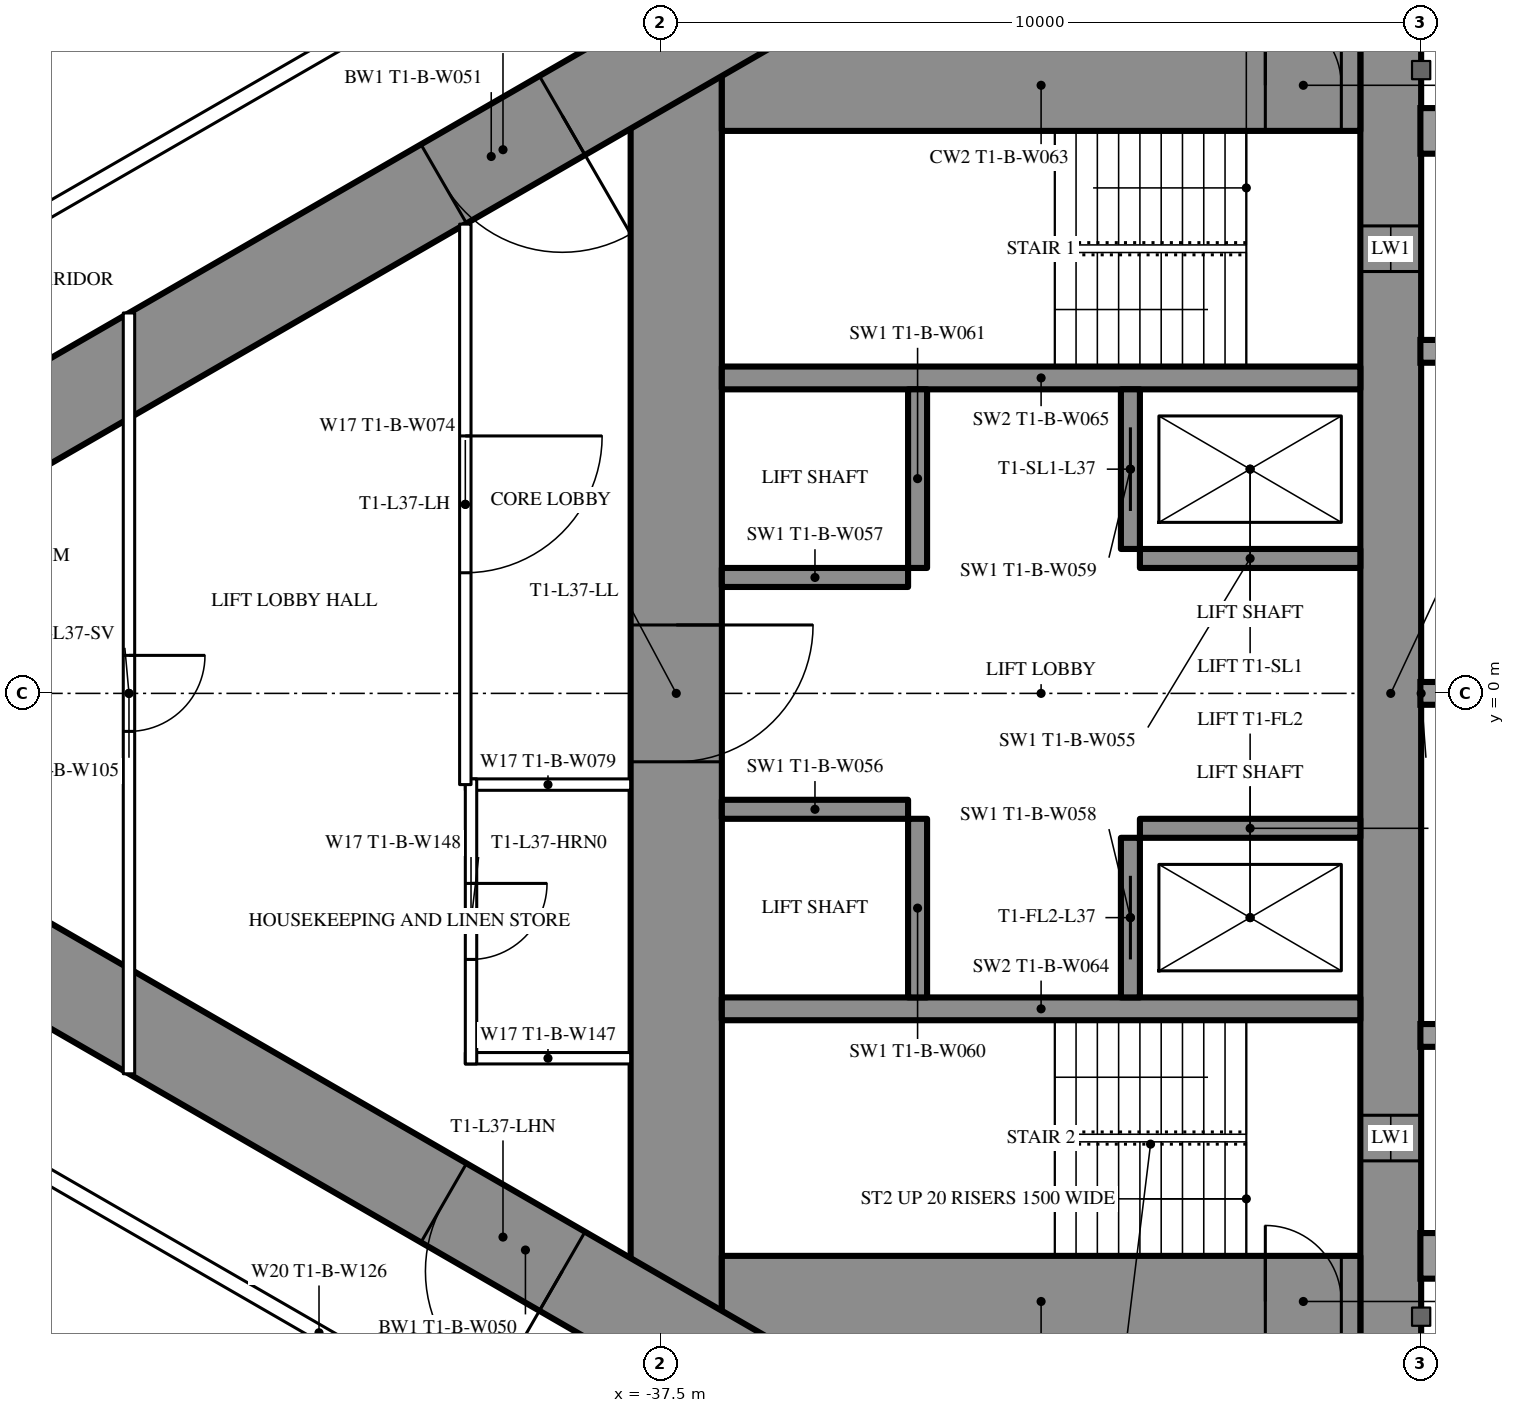
"""IFC4 building model, lengths in metres.
Left out: names, types, materials, properties, quantities, classifications, styles, units other than length and angle.
Written with IfcOpenShell. Run it as: python <this file> out.ifc"""

import sys

from ifc_helpers import new_model, si_unit, direction, frame, frame_2d, origin, place, context, subcontext, project, spatial, rectangle, extrude, element, fill, save


model = new_model("IFC4")
c1 = context("Model", 3, precision=1e-05, world=origin(), true_north=direction((0.0, 1.0)))
c2 = subcontext(c1, "Body", "Model", "MODEL_VIEW")
j1 = project(units=[si_unit("LENGTHUNIT", "METRE"), si_unit("PLANEANGLEUNIT", "RADIAN")], contexts=[c1])
p1 = place(None, origin())
s1 = spatial("IfcSite", under=j1, at=p1, CompositionType="ELEMENT")
p2 = place(p1, origin())
s2 = spatial("IfcBuilding", under=s1, at=p2, CompositionType="ELEMENT")
p3 = place(p2, frame((0.0, 0.0, 139.6)))
s3 = spatial("IfcBuildingStorey", under=s2, at=p3, CompositionType="ELEMENT", Elevation=139.6)
p4 = place(p3, frame((-27.9, 8.6, 0.0), z_axis=(0.0, 0.0, 1.0), x_axis=(0.0, -1.0, 0.0)))
e1 = element("IfcWall", 1, at=p4, inside=s3, PredefinedType="SHEAR", context=c2, shape_type="SweptSolid", body=[
    extrude(rectangle(XDim=17.2, YDim=0.8, at=frame_2d((8.6, 0.0))), origin(), (0.0, 0.0, 1.0), 3.5),
])
p5 = place(p4, frame((2.45, 0.0, 0.6)))
e2 = element("IfcOpeningElement", 2, at=p5, cuts=e1, PredefinedType="OPENING", context=c2, shape_type="SweptSolid", body=[
    extrude(rectangle(XDim=0.6, YDim=2.1, at=frame_2d((0.3, 1.05))), frame((0.0, 0.41, 0.0), z_axis=(0.0, -1.0, 0.0), x_axis=(1.0, 0.0, 0.0)), (0.0, 0.0, 1.0), 0.82),
])
p6 = place(p4, frame((14.15, 0.0, 0.6)))
e3 = element("IfcOpeningElement", 3, at=p6, cuts=e1, PredefinedType="OPENING", context=c2, shape_type="SweptSolid", body=[
    extrude(rectangle(XDim=0.6, YDim=2.1, at=frame_2d((0.3, 1.05))), frame((0.0, 0.41, 0.0), z_axis=(0.0, -1.0, 0.0), x_axis=(1.0, 0.0, 0.0)), (0.0, 0.0, 1.0), 0.82),
])
p7 = place(p3, frame((-37.3, 8.6, 0.0), z_axis=(0.0, 0.0, 1.0), x_axis=(0.0, -1.0, 0.0)))
e4 = element("IfcWall", 4, at=p7, inside=s3, PredefinedType="SHEAR", context=c2, shape_type="SweptSolid", body=[
    extrude(rectangle(XDim=17.2, YDim=1.2, at=frame_2d((8.6, 0.0))), origin(), (0.0, 0.0, 1.0), 3.5),
])
p8 = place(p7, frame((7.7, 0.0, 0.0)))
e5 = element("IfcOpeningElement", 5, at=p8, cuts=e4, PredefinedType="OPENING", context=c2, shape_type="SweptSolid", body=[
    extrude(rectangle(XDim=1.8, YDim=2.2, at=frame_2d((0.9, 1.1))), frame((0.0, 0.61, 0.0), z_axis=(0.0, -1.0, 0.0), x_axis=(1.0, 0.0, 0.0)), (0.0, 0.0, 1.0), 1.22),
])
p9 = place(p3, frame((-28.3, 8.0, 0.0), z_axis=(0.0, 0.0, 1.0), x_axis=(-1.0, 0.0, 0.0)))
e6 = element("IfcWall", 6, at=p9, inside=s3, PredefinedType="SHEAR", context=c2, shape_type="SweptSolid", body=[
    extrude(rectangle(XDim=8.4, YDim=1.2, at=frame_2d((4.2, 0.0))), origin(), (0.0, 0.0, 1.0), 3.5),
])
p10 = place(p9, frame((0.25, 0.0, 0.0)))
e7 = element("IfcOpeningElement", 7, at=p10, cuts=e6, PredefinedType="OPENING", context=c2, shape_type="SweptSolid", body=[
    extrude(rectangle(XDim=1.0, YDim=2.2, at=frame_2d((0.5, 1.1))), frame((0.0, 0.61, 0.0), z_axis=(0.0, -1.0, 0.0), x_axis=(1.0, 0.0, 0.0)), (0.0, 0.0, 1.0), 1.22),
])
p11 = place(p3, frame((-28.3, -8.0, 0.0), z_axis=(0.0, 0.0, 1.0), x_axis=(-1.0, 0.0, 0.0)))
e8 = element("IfcWall", 8, at=p11, inside=s3, PredefinedType="SHEAR", context=c2, shape_type="SweptSolid", body=[
    extrude(rectangle(XDim=8.4, YDim=1.2, at=frame_2d((4.2, 0.0))), origin(), (0.0, 0.0, 1.0), 3.5),
])
p12 = place(p11, frame((0.25, 0.0, 0.0)))
e9 = element("IfcOpeningElement", 9, at=p12, cuts=e8, PredefinedType="OPENING", context=c2, shape_type="SweptSolid", body=[
    extrude(rectangle(XDim=1.0, YDim=2.2, at=frame_2d((0.5, 1.1))), frame((0.0, 0.61, 0.0), z_axis=(0.0, -1.0, 0.0), x_axis=(1.0, 0.0, 0.0)), (0.0, 0.0, 1.0), 1.22),
])
for number, where, z_axis, x_axis in (
    (10, (-28.3, 4.15, 0.0), (0.0, 0.0, 1.0), (-1.0, 0.0, 0.0)),
    (11, (-28.3, -4.15, 0.0), (0.0, 0.0, 1.0), (-1.0, 0.0, 0.0)),
):
    element("IfcWall", number, at=place(p3, frame(where, z_axis=z_axis, x_axis=x_axis)), inside=s3, PredefinedType="SHEAR", context=c2, shape_type="SweptSolid", body=[
        extrude(rectangle(XDim=8.4, YDim=0.3, at=frame_2d((4.2, 0.0))), origin(), (0.0, 0.0, 1.0), 3.5),
    ])
p13 = place(p3, frame((-31.325, 4.0, 0.0), z_axis=(0.0, 0.0, 1.0), x_axis=(0.0, -1.0, 0.0)))
e12 = element("IfcWall", 12, at=p13, inside=s3, PredefinedType="SHEAR", context=c2, shape_type="SweptSolid", body=[
    extrude(rectangle(XDim=2.1, YDim=0.25, at=frame_2d((1.05, 0.0))), origin(), (0.0, 0.0, 1.0), 3.5),
])
p14 = place(p13, frame((0.5, 0.0, 0.0)))
e13 = element("IfcOpeningElement", 13, at=p14, cuts=e12, PredefinedType="OPENING", context=c2, shape_type="SweptSolid", body=[
    extrude(rectangle(XDim=1.1, YDim=2.2, at=frame_2d((0.55, 1.1))), frame((0.0, 0.135, 0.0), z_axis=(0.0, -1.0, 0.0), x_axis=(1.0, 0.0, 0.0)), (0.0, 0.0, 1.0), 0.27),
])
p15 = place(p3, frame((-34.125, 4.0, 0.0), z_axis=(0.0, 0.0, 1.0), x_axis=(0.0, -1.0, 0.0)))
e14 = element("IfcWall", 14, at=p15, inside=s3, PredefinedType="SHEAR", context=c2, shape_type="SweptSolid", body=[
    extrude(rectangle(XDim=2.35, YDim=0.25, at=frame_2d((1.175, 0.0))), origin(), (0.0, 0.0, 1.0), 3.5),
])
p16 = place(p3, frame((-28.3, 1.775, 0.0), z_axis=(0.0, 0.0, 1.0), x_axis=(-1.0, 0.0, 0.0)))
e15 = element("IfcWall", 15, at=p16, inside=s3, PredefinedType="SHEAR", context=c2, shape_type="SweptSolid", body=[
    extrude(rectangle(XDim=2.9, YDim=0.25, at=frame_2d((1.45, 0.0))), origin(), (0.0, 0.0, 1.0), 3.5),
])
p17 = place(p3, frame((-34.25, 1.525, 0.0), z_axis=(0.0, 0.0, 1.0), x_axis=(-1.0, 0.0, 0.0)))
e16 = element("IfcWall", 16, at=p17, inside=s3, PredefinedType="SHEAR", context=c2, shape_type="SweptSolid", body=[
    extrude(rectangle(XDim=2.45, YDim=0.25, at=frame_2d((1.225, 0.0))), origin(), (0.0, 0.0, 1.0), 3.5),
])
p18 = place(p3, frame((-31.325, -1.9, 0.0), z_axis=(0.0, 0.0, 1.0), x_axis=(0.0, -1.0, 0.0)))
e17 = element("IfcWall", 17, at=p18, inside=s3, PredefinedType="SHEAR", context=c2, shape_type="SweptSolid", body=[
    extrude(rectangle(XDim=2.1, YDim=0.25, at=frame_2d((1.05, 0.0))), origin(), (0.0, 0.0, 1.0), 3.5),
])
p19 = place(p18, frame((0.5, 0.0, 0.0)))
e18 = element("IfcOpeningElement", 18, at=p19, cuts=e17, PredefinedType="OPENING", context=c2, shape_type="SweptSolid", body=[
    extrude(rectangle(XDim=1.1, YDim=2.2, at=frame_2d((0.55, 1.1))), frame((0.0, 0.135, 0.0), z_axis=(0.0, -1.0, 0.0), x_axis=(1.0, 0.0, 0.0)), (0.0, 0.0, 1.0), 0.27),
])
p20 = place(p3, frame((-34.125, -1.65, 0.0), z_axis=(0.0, 0.0, 1.0), x_axis=(0.0, -1.0, 0.0)))
e19 = element("IfcWall", 19, at=p20, inside=s3, PredefinedType="SHEAR", context=c2, shape_type="SweptSolid", body=[
    extrude(rectangle(XDim=2.35, YDim=0.25, at=frame_2d((1.175, 0.0))), origin(), (0.0, 0.0, 1.0), 3.5),
])
p21 = place(p3, frame((-28.3, -1.775, 0.0), z_axis=(0.0, 0.0, 1.0), x_axis=(-1.0, 0.0, 0.0)))
e20 = element("IfcWall", 20, at=p21, inside=s3, PredefinedType="SHEAR", context=c2, shape_type="SweptSolid", body=[
    extrude(rectangle(XDim=2.9, YDim=0.25, at=frame_2d((1.45, 0.0))), origin(), (0.0, 0.0, 1.0), 3.5),
])
p22 = place(p3, frame((-34.25, -1.525, 0.0), z_axis=(0.0, 0.0, 1.0), x_axis=(-1.0, 0.0, 0.0)))
e21 = element("IfcWall", 21, at=p22, inside=s3, PredefinedType="SHEAR", context=c2, shape_type="SweptSolid", body=[
    extrude(rectangle(XDim=2.45, YDim=0.25, at=frame_2d((1.225, 0.0))), origin(), (0.0, 0.0, 1.0), 3.5),
])
p23 = place(p3, frame((-27.2, 14.3, 0.0), z_axis=(0.0, 0.0, 1.0), x_axis=(-0.866026593062, -0.499997940104, 0.0)))
e22 = element("IfcWall", 22, at=p23, inside=s3, PredefinedType="SHEAR", context=c2, shape_type="SweptSolid", body=[
    extrude(rectangle(XDim=28.946, YDim=1.2, at=frame_2d((14.473, 0.0))), origin(), (0.0, 0.0, 1.0), 3.5),
])
p24 = place(p23, frame((4.6, 0.0, 0.0)))
e23 = element("IfcOpeningElement", 23, at=p24, cuts=e22, PredefinedType="OPENING", context=c2, shape_type="SweptSolid", body=[
    extrude(rectangle(XDim=1.0, YDim=2.2, at=frame_2d((0.5, 1.1))), frame((0.0, 0.61, 0.0), z_axis=(0.0, -1.0, 0.0), x_axis=(1.0, 0.0, 0.0)), (0.0, 0.0, 1.0), 1.22),
])
p25 = place(p23, frame((13.395, 0.0, 0.0)))
e24 = element("IfcOpeningElement", 24, at=p25, cuts=e22, PredefinedType="OPENING", context=c2, shape_type="SweptSolid", body=[
    extrude(rectangle(XDim=1.8, YDim=2.2, at=frame_2d((0.9, 1.1))), frame((0.0, 0.61, 0.0), z_axis=(0.0, -1.0, 0.0), x_axis=(1.0, 0.0, 0.0)), (0.0, 0.0, 1.0), 1.22),
])
p26 = place(p3, frame((-27.2, -14.3, 0.0), z_axis=(0.0, 0.0, 1.0), x_axis=(-0.866024021859, 0.500002393557, 0.0)))
e25 = element("IfcWall", 25, at=p26, inside=s3, PredefinedType="SHEAR", context=c2, shape_type="SweptSolid", body=[
    extrude(rectangle(XDim=27.907, YDim=1.2, at=frame_2d((13.954, 0.0))), origin(), (0.0, 0.0, 1.0), 3.5),
])
p27 = place(p26, frame((4.6, 0.0, 0.0)))
e26 = element("IfcOpeningElement", 26, at=p27, cuts=e25, PredefinedType="OPENING", context=c2, shape_type="SweptSolid", body=[
    extrude(rectangle(XDim=1.0, YDim=2.2, at=frame_2d((0.5, 1.1))), frame((0.0, 0.61, 0.0), z_axis=(0.0, -1.0, 0.0), x_axis=(1.0, 0.0, 0.0)), (0.0, 0.0, 1.0), 1.22),
])
p28 = place(p26, frame((13.395, 0.0, 0.0)))
e27 = element("IfcOpeningElement", 27, at=p28, cuts=e25, PredefinedType="OPENING", context=c2, shape_type="SweptSolid", body=[
    extrude(rectangle(XDim=1.8, YDim=2.2, at=frame_2d((0.9, 1.1))), frame((0.0, 0.61, 0.0), z_axis=(0.0, -1.0, 0.0), x_axis=(1.0, 0.0, 0.0)), (0.0, 0.0, 1.0), 1.22),
])
p29 = place(p3, frame((-37.7, 10.894, 0.0), z_axis=(0.0, 0.0, 1.0), x_axis=(-0.866027905338, -0.499995667157, 0.0)))
e28 = element("IfcWall", 28, at=p29, inside=s3, PredefinedType="PARTITIONING", context=c2, shape_type="SweptSolid", body=[
    extrude(rectangle(XDim=21.787, YDim=0.2, at=frame_2d((10.894, 0.0))), origin(), (0.0, 0.0, 1.0), 3.25),
])
p30 = place(p29, frame((17.711, 0.0, 0.0)))
e29 = element("IfcOpeningElement", 29, at=p30, cuts=e28, PredefinedType="OPENING", context=c2, shape_type="SweptSolid", body=[
    extrude(rectangle(XDim=0.95, YDim=2.2, at=frame_2d((0.475, 1.1))), frame((0.0, 0.11, 0.0), z_axis=(0.0, -1.0, 0.0), x_axis=(1.0, 0.0, 0.0)), (0.0, 0.0, 1.0), 0.22),
])
p31 = place(p29, frame((19.399, 0.0, 0.0)))
e30 = element("IfcOpeningElement", 30, at=p31, cuts=e28, PredefinedType="OPENING", context=c2, shape_type="SweptSolid", body=[
    extrude(rectangle(XDim=1.8, YDim=2.2, at=frame_2d((0.9, 1.1))), frame((0.0, 0.11, 0.0), z_axis=(0.0, -1.0, 0.0), x_axis=(1.0, 0.0, 0.0)), (0.0, 0.0, 1.0), 0.22),
])
p32 = place(p29, frame((0.6, 0.0, 0.0)))
e31 = element("IfcOpeningElement", 31, at=p32, cuts=e28, PredefinedType="OPENING", context=c2, shape_type="SweptSolid", body=[
    extrude(rectangle(XDim=0.95, YDim=2.2, at=frame_2d((0.475, 1.1))), frame((0.0, 0.11, 0.0), z_axis=(0.0, -1.0, 0.0), x_axis=(1.0, 0.0, 0.0)), (0.0, 0.0, 1.0), 0.22),
])
p33 = place(p3, frame((-36.92, -11.344, 0.0), z_axis=(0.0, 0.0, 1.0), x_axis=(-0.866027897759, 0.499995680284, 0.0)))
e32 = element("IfcWall", 32, at=p33, inside=s3, PredefinedType="PARTITIONING", context=c2, shape_type="SweptSolid", body=[
    extrude(rectangle(XDim=11.731, YDim=0.2, at=frame_2d((5.865, 0.0))), origin(), (0.0, 0.0, 1.0), 3.25),
])
p34 = place(p33, frame((3.35, 0.0, 0.0)))
e33 = element("IfcOpeningElement", 33, at=p34, cuts=e32, PredefinedType="OPENING", context=c2, shape_type="SweptSolid", body=[
    extrude(rectangle(XDim=1.0, YDim=2.2, at=frame_2d((0.5, 1.1))), frame((0.0, 0.11, 0.0), z_axis=(0.0, -1.0, 0.0), x_axis=(1.0, 0.0, 0.0)), (0.0, 0.0, 1.0), 0.22),
])
for number, where, z_axis, x_axis in (
    (34, (-37.9, -1.2, 0.0), (0.0, 0.0, 1.0), (-1.0, 0.0, 0.0)),
    (35, (-37.9, -4.8, 0.0), (0.0, 0.0, 1.0), (-1.0, 0.0, 0.0)),
):
    element("IfcWall", number, at=place(p3, frame(where, z_axis=z_axis, x_axis=x_axis)), inside=s3, PredefinedType="PARTITIONING", context=c2, shape_type="SweptSolid", body=[
        extrude(rectangle(XDim=2.175, YDim=0.15, at=frame_2d((1.087, 0.0))), origin(), (0.0, 0.0, 1.0), 3.25),
    ])
p35 = place(p3, frame((-40.0, -1.125, 0.0), z_axis=(0.0, 0.0, 1.0), x_axis=(0.0, -1.0, 0.0)))
e36 = element("IfcWall", 36, at=p35, inside=s3, PredefinedType="PARTITIONING", context=c2, shape_type="SweptSolid", body=[
    extrude(rectangle(XDim=3.75, YDim=0.15, at=frame_2d((1.875, 0.0))), origin(), (0.0, 0.0, 1.0), 3.25),
])
p36 = place(p35, frame((1.375, 0.0, 0.0)))
e37 = element("IfcOpeningElement", 37, at=p36, cuts=e36, PredefinedType="OPENING", context=c2, shape_type="SweptSolid", body=[
    extrude(rectangle(XDim=1.0, YDim=2.2, at=frame_2d((0.5, 1.1))), frame((0.0, 0.085, 0.0), z_axis=(0.0, -1.0, 0.0), x_axis=(1.0, 0.0, 0.0)), (0.0, 0.0, 1.0), 0.17),
])
p37 = place(p3, frame((-40.075, 6.174, 0.0), z_axis=(0.0, 0.0, 1.0), x_axis=(0.0, -1.0, 0.0)))
e38 = element("IfcWall", 38, at=p37, inside=s3, PredefinedType="PARTITIONING", context=c2, shape_type="SweptSolid", body=[
    extrude(rectangle(XDim=7.374, YDim=0.15, at=frame_2d((3.687, 0.0))), origin(), (0.0, 0.0, 1.0), 3.25),
])
p38 = place(p37, frame((2.787, 0.0, 0.0)))
e39 = element("IfcOpeningElement", 39, at=p38, cuts=e38, PredefinedType="OPENING", context=c2, shape_type="SweptSolid", body=[
    extrude(rectangle(XDim=1.8, YDim=2.2, at=frame_2d((0.9, 1.1))), frame((0.0, 0.085, 0.0), z_axis=(0.0, -1.0, 0.0), x_axis=(1.0, 0.0, 0.0)), (0.0, 0.0, 1.0), 0.17),
])
p39 = place(p3, frame((-44.5, 5.005, 0.0), z_axis=(0.0, 0.0, 1.0), x_axis=(0.0, -1.0, 0.0)))
e40 = element("IfcWall", 40, at=p39, inside=s3, PredefinedType="PARTITIONING", context=c2, shape_type="SweptSolid", body=[
    extrude(rectangle(XDim=10.009, YDim=0.15, at=frame_2d((5.005, 0.0))), origin(), (0.0, 0.0, 1.0), 2.45),
])
p40 = place(p39, frame((4.505, 0.0, 0.0)))
e41 = element("IfcOpeningElement", 41, at=p40, cuts=e40, PredefinedType="OPENING", context=c2, shape_type="SweptSolid", body=[
    extrude(rectangle(XDim=1.0, YDim=2.2, at=frame_2d((0.5, 1.1))), frame((0.0, 0.085, 0.0), z_axis=(0.0, -1.0, 0.0), x_axis=(1.0, 0.0, 0.0)), (0.0, 0.0, 1.0), 0.17),
])
p41 = place(p36, origin())
e42 = element("IfcDoor", 42, at=p41, inside=s3, OperationType="SINGLE_SWING_LEFT", PredefinedType="DOOR", context=c2, shape_type="SweptSolid", body=[
    extrude(rectangle(XDim=1.0, YDim=2.2, at=frame_2d((0.5, 1.1))), frame((0.0, 0.025, 0.0), z_axis=(0.0, -1.0, 0.0), x_axis=(1.0, 0.0, 0.0)), (0.0, 0.0, 1.0), 0.05),
])
fill(e37, e42)
p42 = place(p38, origin())
e43 = element("IfcDoor", 43, at=p42, inside=s3, OperationType="DOUBLE_DOOR_SINGLE_SWING", PredefinedType="DOOR", context=c2, shape_type="SweptSolid", body=[
    extrude(rectangle(XDim=1.8, YDim=2.2, at=frame_2d((0.9, 1.1))), frame((0.0, 0.025, 0.0), z_axis=(0.0, -1.0, 0.0), x_axis=(1.0, 0.0, 0.0)), (0.0, 0.0, 1.0), 0.05),
])
fill(e39, e43)
p43 = place(p40, origin())
e44 = element("IfcDoor", 44, at=p43, inside=s3, OperationType="SINGLE_SWING_LEFT", PredefinedType="DOOR", context=c2, shape_type="SweptSolid", body=[
    extrude(rectangle(XDim=1.0, YDim=2.2, at=frame_2d((0.5, 1.1))), frame((0.0, 0.025, 0.0), z_axis=(0.0, -1.0, 0.0), x_axis=(1.0, 0.0, 0.0)), (0.0, 0.0, 1.0), 0.05),
])
fill(e41, e44)
p44 = place(p25, origin())
e45 = element("IfcDoor", 45, at=p44, inside=s3, OperationType="DOUBLE_DOOR_SINGLE_SWING", PredefinedType="DOOR", context=c2, shape_type="SweptSolid", body=[
    extrude(rectangle(XDim=1.8, YDim=2.2, at=frame_2d((0.9, 1.1))), frame((0.0, 0.025, 0.0), z_axis=(0.0, -1.0, 0.0), x_axis=(1.0, 0.0, 0.0)), (0.0, 0.0, 1.0), 0.05),
])
fill(e24, e45)
p45 = place(p28, origin())
e46 = element("IfcDoor", 46, at=p45, inside=s3, OperationType="DOUBLE_DOOR_SINGLE_SWING", PredefinedType="DOOR", context=c2, shape_type="SweptSolid", body=[
    extrude(rectangle(XDim=1.8, YDim=2.2, at=frame_2d((0.9, 1.1))), frame((0.0, 0.025, 0.0), z_axis=(0.0, -1.0, 0.0), x_axis=(1.0, 0.0, 0.0)), (0.0, 0.0, 1.0), 0.05),
])
fill(e27, e46)
p46 = place(p8, origin())
e47 = element("IfcDoor", 47, at=p46, inside=s3, OperationType="DOUBLE_DOOR_SINGLE_SWING", PredefinedType="DOOR", context=c2, shape_type="SweptSolid", body=[
    extrude(rectangle(XDim=1.8, YDim=2.2, at=frame_2d((0.9, 1.1))), frame((0.0, 0.025, 0.0), z_axis=(0.0, -1.0, 0.0), x_axis=(1.0, 0.0, 0.0)), (0.0, 0.0, 1.0), 0.05),
])
fill(e5, e47)
p47 = place(p10, origin())
e48 = element("IfcDoor", 48, at=p47, inside=s3, OperationType="SINGLE_SWING_RIGHT", PredefinedType="DOOR", context=c2, shape_type="SweptSolid", body=[
    extrude(rectangle(XDim=1.0, YDim=2.2, at=frame_2d((0.5, 1.1))), frame((0.0, 0.025, 0.0), z_axis=(0.0, -1.0, 0.0), x_axis=(1.0, 0.0, 0.0)), (0.0, 0.0, 1.0), 0.05),
])
fill(e7, e48)
p48 = place(p12, origin())
e49 = element("IfcDoor", 49, at=p48, inside=s3, OperationType="SINGLE_SWING_RIGHT", PredefinedType="DOOR", context=c2, shape_type="SweptSolid", body=[
    extrude(rectangle(XDim=1.0, YDim=2.2, at=frame_2d((0.5, 1.1))), frame((0.0, 0.025, 0.0), z_axis=(0.0, -1.0, 0.0), x_axis=(1.0, 0.0, 0.0)), (0.0, 0.0, 1.0), 0.05),
])
fill(e9, e49)
p49 = place(p14, origin())
e50 = element("IfcDoor", 50, at=p49, inside=s3, OperationType="SLIDING_TO_LEFT", PredefinedType="USERDEFINED", context=c2, shape_type="SweptSolid", body=[
    extrude(rectangle(XDim=1.1, YDim=2.2, at=frame_2d((0.55, 1.1))), frame((0.0, 0.025, 0.0), z_axis=(0.0, -1.0, 0.0), x_axis=(1.0, 0.0, 0.0)), (0.0, 0.0, 1.0), 0.05),
])
fill(e13, e50)
p50 = place(p19, origin())
e51 = element("IfcDoor", 51, at=p50, inside=s3, OperationType="SLIDING_TO_LEFT", PredefinedType="USERDEFINED", context=c2, shape_type="SweptSolid", body=[
    extrude(rectangle(XDim=1.1, YDim=2.2, at=frame_2d((0.55, 1.1))), frame((0.0, 0.025, 0.0), z_axis=(0.0, -1.0, 0.0), x_axis=(1.0, 0.0, 0.0)), (0.0, 0.0, 1.0), 0.05),
])
fill(e18, e51)
p51 = place(p5, origin())
e52 = element("IfcWindow", 52, at=p51, inside=s3, PartitioningType="SINGLE_PANEL", PredefinedType="WINDOW", context=c2, shape_type="SweptSolid", body=[
    extrude(rectangle(XDim=0.6, YDim=2.1, at=frame_2d((0.3, 1.05))), frame((0.0, 0.03, 0.0), z_axis=(0.0, -1.0, 0.0), x_axis=(1.0, 0.0, 0.0)), (0.0, 0.0, 1.0), 0.06),
])
fill(e2, e52)
p52 = place(p6, origin())
e53 = element("IfcWindow", 53, at=p52, inside=s3, PartitioningType="SINGLE_PANEL", PredefinedType="WINDOW", context=c2, shape_type="SweptSolid", body=[
    extrude(rectangle(XDim=0.6, YDim=2.1, at=frame_2d((0.3, 1.05))), frame((0.0, 0.03, 0.0), z_axis=(0.0, -1.0, 0.0), x_axis=(1.0, 0.0, 0.0)), (0.0, 0.0, 1.0), 0.06),
])
fill(e3, e53)
save(model, sys.argv[1])
